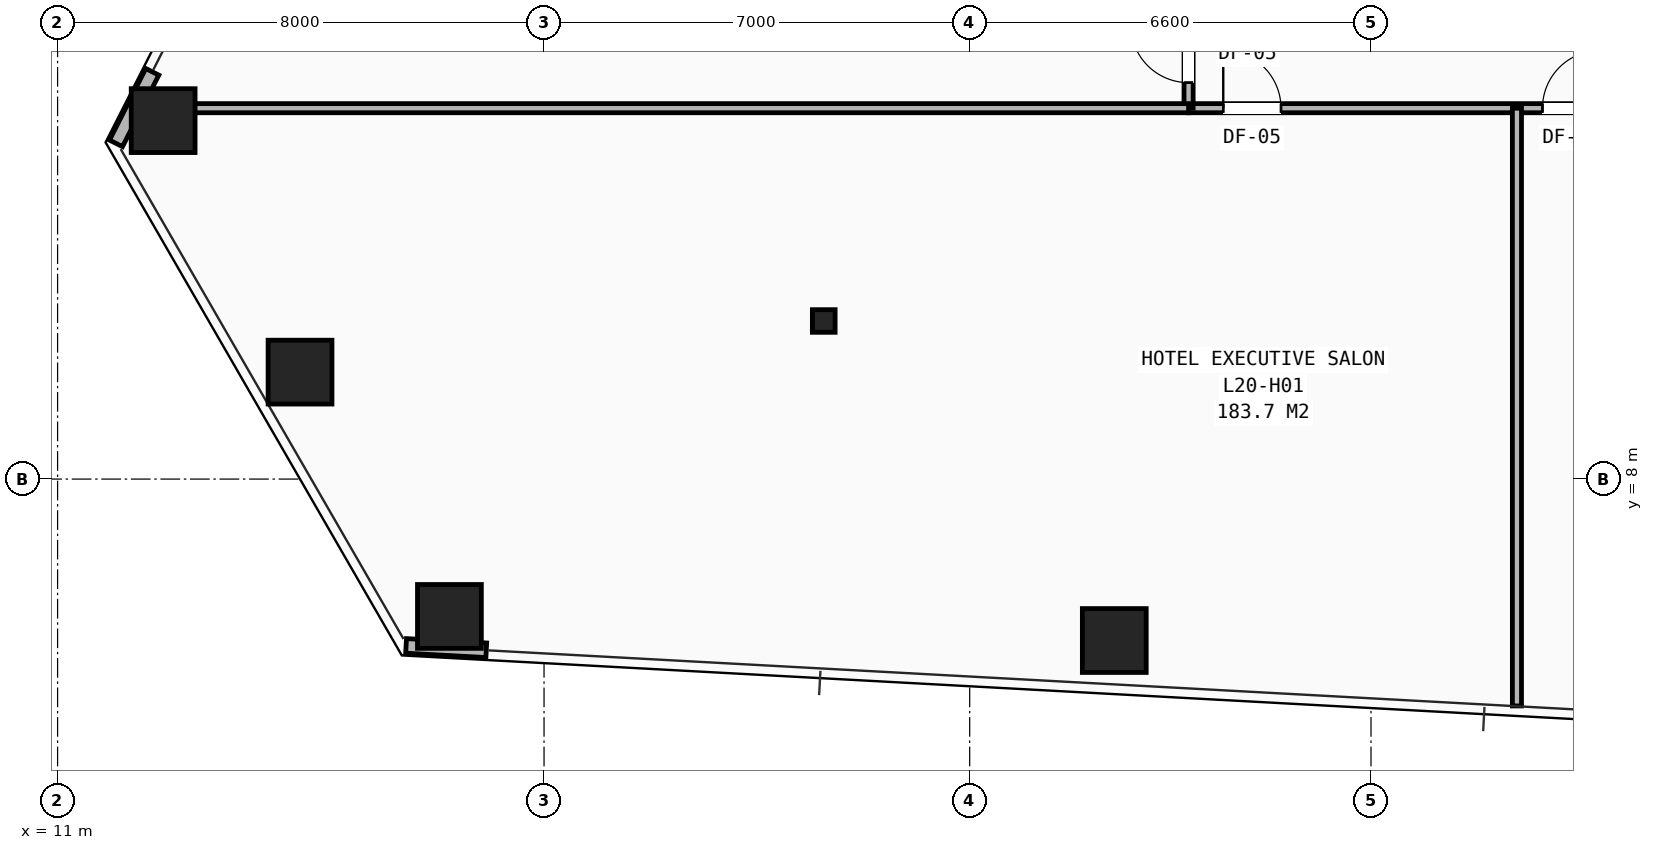
"""IFC4 building model, lengths in metres.
Left out: names, types, materials, properties, quantities, classifications, styles, units other than length and angle.
Written with IfcOpenShell. Run it as: python <this file> out.ifc"""

import sys

from ifc_helpers import new_model, si_unit, direction, frame, frame_2d, origin, origin_2d, place, context, subcontext, project, spatial, rectangle, hollow_rectangle, i_section, extrude, element, fill, save


model = new_model("IFC4")
c1 = context("Model", 3, precision=1e-05, world=origin(), true_north=direction((0.0, 1.0)))
c2 = subcontext(c1, "Body", "Model", "MODEL_VIEW")
j1 = project(units=[si_unit("LENGTHUNIT", "METRE"), si_unit("PLANEANGLEUNIT", "RADIAN")], contexts=[c1])
p1 = place(None, origin())
s1 = spatial("IfcSite", under=j1, at=p1, CompositionType="ELEMENT")
p2 = place(p1, origin())
s2 = spatial("IfcBuilding", under=s1, at=p2, CompositionType="ELEMENT")
p3 = place(p2, frame((0.0, 0.0, 73.4)))
s3 = spatial("IfcBuildingStorey", under=s2, at=p3, CompositionType="ELEMENT", Elevation=73.4)
p4 = place(p3, frame((23.6, 10.6, 0.0), z_axis=(0.0, 0.0, 1.0), x_axis=(1.0, 0.0, 0.0)))
e1 = element("IfcColumn", 1, at=p4, inside=s3, PredefinedType="COLUMN", context=c2, shape_type="SweptSolid", body=[
    extrude(i_section(OverallWidth=0.374, OverallDepth=0.372, WebThickness=0.016, FlangeThickness=0.026, at=origin_2d()), origin(), (0.0, 0.0, 1.0), 3.2),
])
for number, where, z_axis, x_axis in (
    (2, (12.736, 13.896, 0.0), (0.0, 0.0, 1.0), (1.0, 0.0, 0.0)),
    (3, (14.987, 9.759, 0.0), (0.0, 0.0, 1.0), (1.0, 0.0, 0.0)),
    (4, (17.444, 5.741, 0.0), (0.0, 0.0, 1.0), (1.0, 0.0, 0.0)),
    (5, (28.378, 5.344, 0.0), (0.0, 0.0, 1.0), (1.0, 0.0, 0.0)),
):
    element("IfcColumn", number, at=place(p3, frame(where, z_axis=z_axis, x_axis=x_axis)), inside=s3, PredefinedType="COLUMN", context=c2, shape_type="SweptSolid", body=[
        extrude(hollow_rectangle(XDim=1.05, YDim=1.05, WallThickness=0.07, at=origin_2d()), origin(), (0.0, 0.0, 1.0), 3.2),
    ])
p5 = place(p3, frame((12.557, 14.698, 0.0), z_axis=(0.0, 0.0, 1.0), x_axis=(-0.452239623624, -0.891896475396, 0.0)))
e6 = element("IfcWall", 6, at=p5, inside=s3, PredefinedType="SHEAR", context=c2, shape_type="SweptSolid", body=[
    extrude(rectangle(XDim=1.319, YDim=0.24, at=frame_2d((0.66, 0.0))), origin(), (0.0, 0.0, 1.0), 2.253),
])
p6 = place(p3, frame((16.731, 5.256, 0.0), z_axis=(0.0, 0.0, 1.0), x_axis=(0.998531751411, -0.054169561778, 0.0)))
e7 = element("IfcWall", 7, at=p6, inside=s3, PredefinedType="SHEAR", context=c2, shape_type="SweptSolid", body=[
    extrude(rectangle(XDim=1.321, YDim=0.24, at=frame_2d((0.66, 0.0))), origin(), (0.0, 0.0, 1.0), 2.253),
])
p7 = place(p3, frame((29.6, 14.1, 0.0), z_axis=(0.0, 0.0, 1.0), x_axis=(1.0, 0.0, 0.0)))
e8 = element("IfcWall", 8, at=p7, inside=s3, PredefinedType="PARTITIONING", context=c2, shape_type="SweptSolid", body=[
    extrude(rectangle(XDim=20.8, YDim=0.15, at=frame_2d((10.4, 0.0))), origin(), (0.0, 0.0, 1.0), 2.421),
])
p8 = place(p7, frame((0.57, 0.0, 0.0)))
e9 = element("IfcOpeningElement", 9, at=p8, cuts=e8, PredefinedType="OPENING", context=c2, shape_type="SweptSolid", body=[
    extrude(rectangle(XDim=0.95, YDim=2.1, at=frame_2d((0.475, 1.05))), frame((0.0, 0.085, 0.0), z_axis=(0.0, -1.0, 0.0), x_axis=(1.0, 0.0, 0.0)), (0.0, 0.0, 1.0), 0.17),
])
p9 = place(p7, frame((5.82, 0.0, 0.0)))
e10 = element("IfcOpeningElement", 10, at=p9, cuts=e8, PredefinedType="OPENING", context=c2, shape_type="SweptSolid", body=[
    extrude(rectangle(XDim=0.95, YDim=2.1, at=frame_2d((0.475, 1.05))), frame((0.0, 0.085, 0.0), z_axis=(0.0, -1.0, 0.0), x_axis=(1.0, 0.0, 0.0)), (0.0, 0.0, 1.0), 0.17),
])
p10 = place(p7, frame((15.02, 0.0, 0.0)))
e11 = element("IfcOpeningElement", 11, at=p10, cuts=e8, PredefinedType="OPENING", context=c2, shape_type="SweptSolid", body=[
    extrude(rectangle(XDim=0.95, YDim=2.1, at=frame_2d((0.475, 1.05))), frame((0.0, 0.085, 0.0), z_axis=(0.0, -1.0, 0.0), x_axis=(1.0, 0.0, 0.0)), (0.0, 0.0, 1.0), 0.17),
])
p11 = place(p3, frame((29.6, 14.1, 0.0), z_axis=(0.0, 0.0, 1.0), x_axis=(0.0, 1.0, 0.0)))
e12 = element("IfcWall", 12, at=p11, inside=s3, PredefinedType="PARTITIONING", context=c2, shape_type="SweptSolid", body=[
    extrude(rectangle(XDim=21.9, YDim=0.15, at=frame_2d((10.95, 0.0))), origin(), (0.0, 0.0, 1.0), 2.421),
])
p12 = place(p11, frame((0.42, 0.0, 0.0)))
e13 = element("IfcOpeningElement", 13, at=p12, cuts=e12, PredefinedType="OPENING", context=c2, shape_type="SweptSolid", body=[
    extrude(rectangle(XDim=0.95, YDim=2.1, at=frame_2d((0.475, 1.05))), frame((0.0, 0.085, 0.0), z_axis=(0.0, -1.0, 0.0), x_axis=(1.0, 0.0, 0.0)), (0.0, 0.0, 1.0), 0.17),
])
p13 = place(p11, frame((5.82, 0.0, 0.0)))
e14 = element("IfcOpeningElement", 14, at=p13, cuts=e12, PredefinedType="OPENING", context=c2, shape_type="SweptSolid", body=[
    extrude(rectangle(XDim=0.95, YDim=2.1, at=frame_2d((0.475, 1.05))), frame((0.0, 0.085, 0.0), z_axis=(0.0, -1.0, 0.0), x_axis=(1.0, 0.0, 0.0)), (0.0, 0.0, 1.0), 0.17),
])
p14 = place(p11, frame((11.32, 0.0, 0.0)))
e15 = element("IfcOpeningElement", 15, at=p14, cuts=e12, PredefinedType="OPENING", context=c2, shape_type="SweptSolid", body=[
    extrude(rectangle(XDim=0.95, YDim=2.1, at=frame_2d((0.475, 1.05))), frame((0.0, 0.085, 0.0), z_axis=(0.0, -1.0, 0.0), x_axis=(1.0, 0.0, 0.0)), (0.0, 0.0, 1.0), 0.17),
])
p15 = place(p11, frame((16.82, 0.0, 0.0)))
e16 = element("IfcOpeningElement", 16, at=p15, cuts=e12, PredefinedType="OPENING", context=c2, shape_type="SweptSolid", body=[
    extrude(rectangle(XDim=0.95, YDim=2.1, at=frame_2d((0.475, 1.05))), frame((0.0, 0.085, 0.0), z_axis=(0.0, -1.0, 0.0), x_axis=(1.0, 0.0, 0.0)), (0.0, 0.0, 1.0), 0.17),
])
p16 = place(p3, frame((35.0, 4.269, 0.0), z_axis=(0.0, 0.0, 1.0), x_axis=(0.0, 1.0, 0.0)))
e17 = element("IfcWall", 17, at=p16, inside=s3, PredefinedType="PARTITIONING", context=c2, shape_type="SweptSolid", body=[
    extrude(rectangle(XDim=9.831, YDim=0.15, at=frame_2d((4.916, 0.0))), origin(), (0.0, 0.0, 1.0), 2.258),
])
p17 = place(p3, frame((12.26, 14.1, 0.0), z_axis=(0.0, 0.0, 1.0), x_axis=(1.0, 0.0, 0.0)))
e18 = element("IfcWall", 18, at=p17, inside=s3, PredefinedType="PARTITIONING", context=c2, shape_type="SweptSolid", body=[
    extrude(rectangle(XDim=17.341, YDim=0.15, at=frame_2d((8.67, 0.0))), origin(), (0.0, 0.0, 1.0), 2.258),
])
p18 = place(p8, origin())
e19 = element("IfcDoor", 19, at=p18, inside=s3, OperationType="SINGLE_SWING_LEFT", PredefinedType="DOOR", context=c2, shape_type="SweptSolid", body=[
    extrude(rectangle(XDim=0.95, YDim=2.1, at=frame_2d((0.475, 1.05))), frame((0.0, 0.025, 0.0), z_axis=(0.0, -1.0, 0.0), x_axis=(1.0, 0.0, 0.0)), (0.0, 0.0, 1.0), 0.05),
])
fill(e9, e19)
p19 = place(p9, origin())
e20 = element("IfcDoor", 20, at=p19, inside=s3, OperationType="SINGLE_SWING_RIGHT", PredefinedType="DOOR", context=c2, shape_type="SweptSolid", body=[
    extrude(rectangle(XDim=0.95, YDim=2.1, at=frame_2d((0.475, 1.05))), frame((0.0, 0.025, 0.0), z_axis=(0.0, -1.0, 0.0), x_axis=(1.0, 0.0, 0.0)), (0.0, 0.0, 1.0), 0.05),
])
fill(e10, e20)
p20 = place(p12, origin())
e21 = element("IfcDoor", 21, at=p20, inside=s3, OperationType="SINGLE_SWING_RIGHT", PredefinedType="DOOR", context=c2, shape_type="SweptSolid", body=[
    extrude(rectangle(XDim=0.95, YDim=2.1, at=frame_2d((0.475, 1.05))), frame((0.0, 0.025, 0.0), z_axis=(0.0, -1.0, 0.0), x_axis=(1.0, 0.0, 0.0)), (0.0, 0.0, 1.0), 0.05),
])
fill(e13, e21)
save(model, sys.argv[1])
